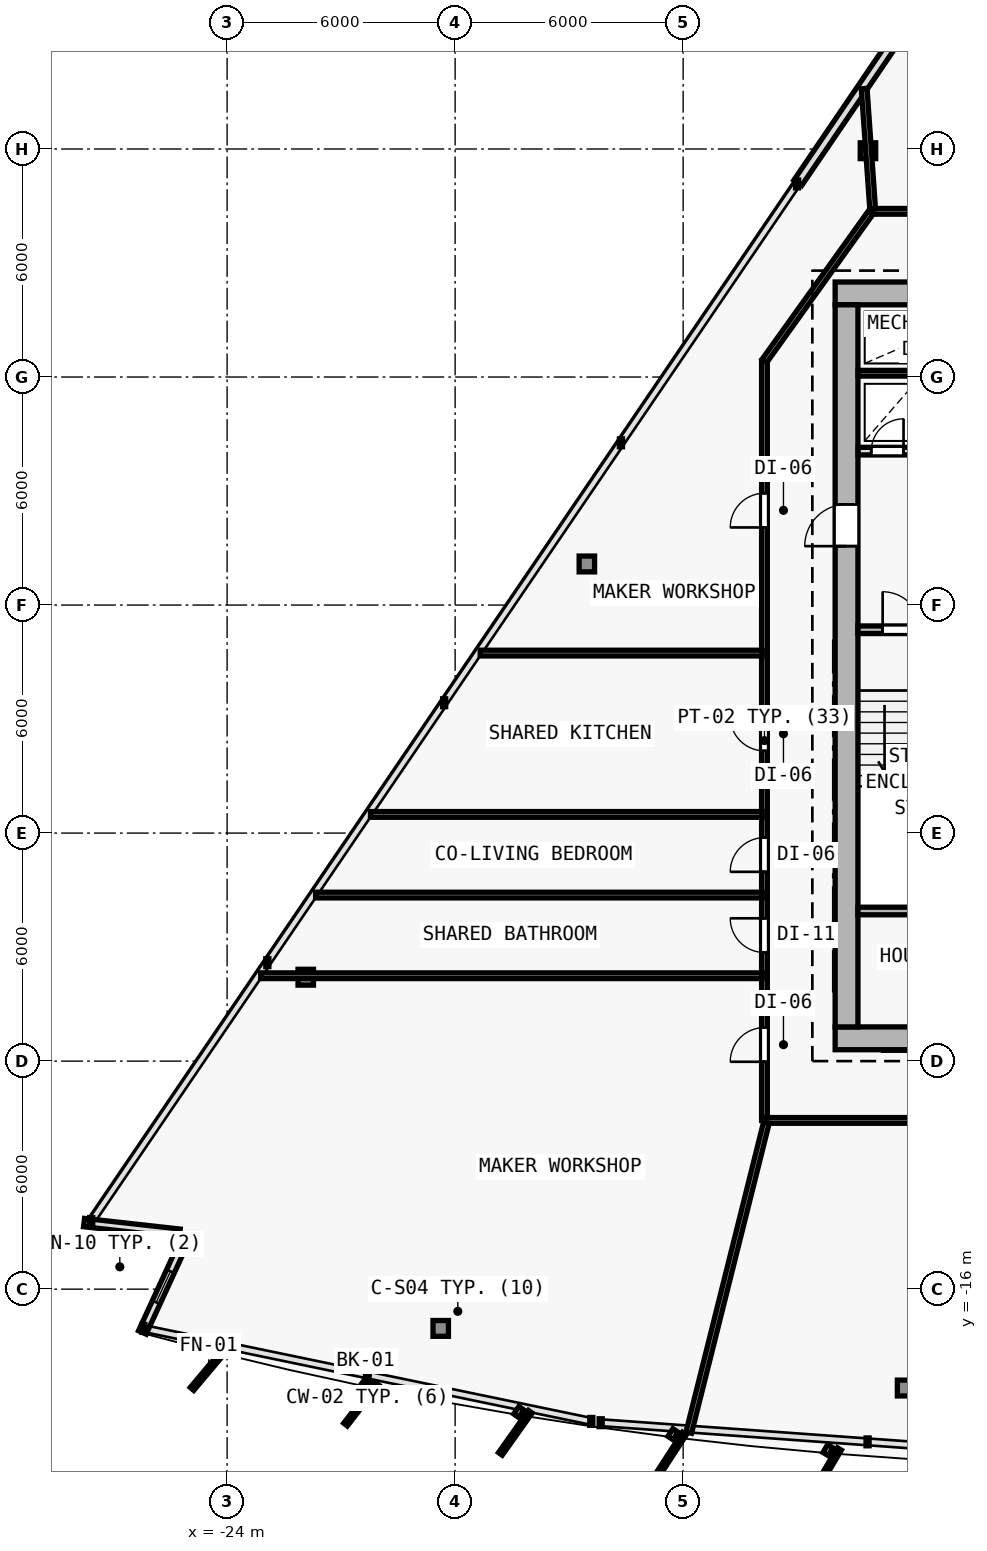
"""IFC4 building model, lengths in metres.
Left out: names, types, materials, properties, quantities, classifications, styles, units other than length and angle.
Written with IfcOpenShell. Run it as: python <this file> out.ifc"""

import sys

from ifc_helpers import new_model, si_unit, direction, frame, frame_2d, origin, origin_2d, place, context, subcontext, project, spatial, rectangle, i_section, extrude, element, fill, save


model = new_model("IFC4")
c1 = context("Model", 3, precision=1e-05, world=origin(), true_north=direction((0.0, 1.0)))
c2 = subcontext(c1, "Body", "Model", "MODEL_VIEW")
j1 = project(units=[si_unit("LENGTHUNIT", "METRE"), si_unit("PLANEANGLEUNIT", "RADIAN")], contexts=[c1])
p1 = place(None, origin())
s1 = spatial("IfcSite", under=j1, at=p1, CompositionType="ELEMENT")
p2 = place(p1, origin())
s2 = spatial("IfcBuilding", under=s1, at=p2, CompositionType="ELEMENT")
p3 = place(p2, frame((0.0, 0.0, 125.7)))
s3 = spatial("IfcBuildingStorey", under=s2, at=p3, CompositionType="ELEMENT", Elevation=125.7)
for number, where, z_axis, x_axis in (
    (1, (-7.7, -9.4, 0.0), (0.0, 0.0, 1.0), (1.0, 0.0, 0.0)),
    (2, (-7.7, 10.2, 0.0), (0.0, 0.0, 1.0), (1.0, 0.0, 0.0)),
    (3, (-7.7, 2.0, 0.0), (0.0, 0.0, 1.0), (1.0, 0.0, 0.0)),
):
    element("IfcColumn", number, at=place(p3, frame(where, z_axis=z_axis, x_axis=x_axis)), inside=s3, PredefinedType="COLUMN", context=c2, shape_type="SweptSolid", body=[
        extrude(i_section(OverallWidth=0.409, OverallDepth=0.425, WebThickness=0.021, FlangeThickness=0.034, FilletRadius=0.015, at=origin_2d()), origin(), (0.0, 0.0, 1.0), 3.6),
    ])
p4 = place(p3, frame((-18.379, -17.033, 0.006), z_axis=(0.020596292833, 0.033511459955, 0.999226087917), x_axis=(-0.851954850327, 0.523615252838, 0.0)))
e4 = element("IfcColumn", 4, at=p4, inside=s3, PredefinedType="COLUMN", context=c2, shape_type="SweptSolid", body=[
    extrude(i_section(OverallWidth=0.406, OverallDepth=0.416, WebThickness=0.019, FlangeThickness=0.031, FilletRadius=0.015, at=origin_2d()), origin(), (0.0, 0.0, 1.0), 3.592),
])
p5 = place(p3, frame((-6.16, -18.602, 0.006), z_axis=(0.006934288159, 0.035283289748, 0.999353293441), x_axis=(-0.981229659911, 0.192842823335, 0.0)))
e5 = element("IfcColumn", 5, at=p5, inside=s3, PredefinedType="COLUMN", context=c2, shape_type="SweptSolid", body=[
    extrude(i_section(OverallWidth=0.406, OverallDepth=0.416, WebThickness=0.019, FlangeThickness=0.031, FilletRadius=0.015, at=origin_2d()), origin(), (0.0, 0.0, 1.0), 3.591),
])
p6 = place(p3, frame((-7.137, 13.954, 0.006), z_axis=(0.008843163607, -0.002516900411, 0.999957730942), x_axis=(0.273743828055, 0.961802639112, 0.0)))
e6 = element("IfcColumn", 6, at=p6, inside=s3, PredefinedType="COLUMN", context=c2, shape_type="SweptSolid", body=[
    extrude(i_section(OverallWidth=0.406, OverallDepth=0.416, WebThickness=0.019, FlangeThickness=0.031, FilletRadius=0.015, at=origin_2d()), origin(), (0.0, 0.0, 1.0), 3.589),
])
p7 = place(p3, frame((-14.533, 3.081, 0.006), z_axis=(0.017003572908, 0.009522000828, 0.999810086971), x_axis=(-0.488603368932, 0.87250601595, 0.0)))
e7 = element("IfcColumn", 7, at=p7, inside=s3, PredefinedType="COLUMN", context=c2, shape_type="SweptSolid", body=[
    extrude(i_section(OverallWidth=0.406, OverallDepth=0.416, WebThickness=0.019, FlangeThickness=0.031, FilletRadius=0.015, at=origin_2d()), origin(), (0.0, 0.0, 1.0), 3.59),
])
p8 = place(p3, frame((-21.93, -7.792, 0.006), z_axis=(0.025224163578, 0.021620711639, 0.999447990843), x_axis=(-0.650791373456, 0.759256602365, 0.0)))
e8 = element("IfcColumn", 8, at=p8, inside=s3, PredefinedType="COLUMN", context=c2, shape_type="SweptSolid", body=[
    extrude(i_section(OverallWidth=0.406, OverallDepth=0.416, WebThickness=0.019, FlangeThickness=0.031, FilletRadius=0.015, at=origin_2d()), origin(), (0.0, 0.0, 1.0), 3.591),
])
p9 = place(p3, frame((-8.984, 13.108, 0.0), z_axis=(0.0, 0.0, 1.0), x_axis=(0.562459365703, 0.826824928225, 0.0)))
e9 = element("IfcWall", 9, at=p9, inside=s3, PredefinedType="SOLIDWALL", context=c2, shape_type="SweptSolid", body=[
    extrude(rectangle(XDim=11.625, YDim=0.25, at=frame_2d((5.812, 0.0))), origin(), (0.0, 0.0, 1.0), 3.28),
])
p10 = place(p9, frame((5.212, 0.0, 0.62)))
e10 = element("IfcOpeningElement", 10, at=p10, cuts=e9, PredefinedType="OPENING", context=c2, shape_type="SweptSolid", body=[
    extrude(rectangle(XDim=1.2, YDim=1.8, at=frame_2d((0.6, 0.9))), frame((0.0, 0.135, 0.0), z_axis=(0.0, -1.0, 0.0), x_axis=(1.0, 0.0, 0.0)), (0.0, 0.0, 1.0), 0.27),
])
p11 = place(p3, frame((-25.246, -14.529, 0.0), z_axis=(0.0, 0.0, 1.0), x_axis=(-0.993831926713, 0.110896805395, 0.0)))
e11 = element("IfcWall", 11, at=p11, inside=s3, PredefinedType="SOLIDWALL", context=c2, shape_type="SweptSolid", body=[
    extrude(rectangle(XDim=2.534, YDim=0.22, at=frame_2d((1.267, 0.0))), origin(), (0.0, 0.0, 1.0), 3.28),
])
p12 = place(p3, frame((-26.229, -17.139, 0.0), z_axis=(0.0, 0.0, 1.0), x_axis=(0.417498108462, 0.908677791866, 0.0)))
e12 = element("IfcWall", 12, at=p12, inside=s3, PredefinedType="SOLIDWALL", context=c2, shape_type="SweptSolid", body=[
    extrude(rectangle(XDim=2.641, YDim=0.22, at=frame_2d((1.32, 0.0))), origin(), (0.0, 0.0, 1.0), 3.28),
])
p13 = place(p12, frame((0.87, 0.0, 0.62)))
e13 = element("IfcOpeningElement", 13, at=p13, cuts=e12, PredefinedType="OPENING", context=c2, shape_type="SweptSolid", body=[
    extrude(rectangle(XDim=0.9, YDim=1.6, at=frame_2d((0.45, 0.8))), frame((0.0, 0.12, 0.0), z_axis=(0.0, -1.0, 0.0), x_axis=(1.0, 0.0, 0.0)), (0.0, 0.0, 1.0), 0.24),
])
p14 = place(p3, frame((-8.0, -9.4, 0.0), z_axis=(0.0, 0.0, 1.0), x_axis=(1.0, 0.0, 0.0)))
e14 = element("IfcWall", 14, at=p14, inside=s3, PredefinedType="SHEAR", context=c2, shape_type="SweptSolid", body=[
    extrude(rectangle(XDim=16.0, YDim=0.6, at=frame_2d((8.0, 0.0))), origin(), (0.0, 0.0, 1.0), 3.28),
])
p15 = place(p14, frame((9.65, 0.0, 0.0)))
e15 = element("IfcOpeningElement", 15, at=p15, cuts=e14, PredefinedType="OPENING", context=c2, shape_type="SweptSolid", body=[
    extrude(rectangle(XDim=1.5, YDim=2.2, at=frame_2d((0.75, 1.1))), frame((0.0, 0.31, 0.0), z_axis=(0.0, -1.0, 0.0), x_axis=(1.0, 0.0, 0.0)), (0.0, 0.0, 1.0), 0.62),
])
p16 = place(p3, frame((8.0, 10.2, 0.0), z_axis=(0.0, 0.0, 1.0), x_axis=(-1.0, 0.0, 0.0)))
e16 = element("IfcWall", 16, at=p16, inside=s3, PredefinedType="SHEAR", context=c2, shape_type="SweptSolid", body=[
    extrude(rectangle(XDim=16.0, YDim=0.6, at=frame_2d((8.0, 0.0))), origin(), (0.0, 0.0, 1.0), 3.28),
])
p17 = place(p16, frame((4.45, 0.0, 0.0)))
e17 = element("IfcOpeningElement", 17, at=p17, cuts=e16, PredefinedType="OPENING", context=c2, shape_type="SweptSolid", body=[
    extrude(rectangle(XDim=1.1, YDim=2.15, at=frame_2d((0.55, 1.075))), frame((0.0, 0.31, 0.0), z_axis=(0.0, -1.0, 0.0), x_axis=(1.0, 0.0, 0.0)), (0.0, 0.0, 1.0), 0.62),
])
p18 = place(p3, frame((-7.7, -9.1, 0.0), z_axis=(0.0, 0.0, 1.0), x_axis=(0.0, 1.0, 0.0)))
e18 = element("IfcWall", 18, at=p18, inside=s3, PredefinedType="SHEAR", context=c2, shape_type="SweptSolid", body=[
    extrude(rectangle(XDim=19.0, YDim=0.6, at=frame_2d((9.5, 0.0))), origin(), (0.0, 0.0, 1.0), 3.28),
])
p19 = place(p18, frame((12.65, 0.0, 0.0)))
e19 = element("IfcOpeningElement", 19, at=p19, cuts=e18, PredefinedType="OPENING", context=c2, shape_type="SweptSolid", body=[
    extrude(rectangle(XDim=1.1, YDim=2.15, at=frame_2d((0.55, 1.075))), frame((0.0, 0.31, 0.0), z_axis=(0.0, -1.0, 0.0), x_axis=(1.0, 0.0, 0.0)), (0.0, 0.0, 1.0), 0.62),
])
p20 = place(p3, frame((-7.4, 1.35, 0.0), z_axis=(0.0, 0.0, 1.0), x_axis=(1.0, 0.0, 0.0)))
e20 = element("IfcWall", 20, at=p20, inside=s3, PredefinedType="SOLIDWALL", context=c2, shape_type="SweptSolid", body=[
    extrude(rectangle(XDim=3.35, YDim=0.2, at=frame_2d((1.675, 0.0))), origin(), (0.0, 0.0, 1.0), 3.28),
])
p21 = place(p20, frame((0.65, 0.0, 0.0)))
e21 = element("IfcOpeningElement", 21, at=p21, cuts=e20, PredefinedType="OPENING", context=c2, shape_type="SweptSolid", body=[
    extrude(rectangle(XDim=1.0, YDim=2.15, at=frame_2d((0.5, 1.075))), frame((0.0, 0.11, 0.0), z_axis=(0.0, -1.0, 0.0), x_axis=(1.0, 0.0, 0.0)), (0.0, 0.0, 1.0), 0.22),
])
p22 = place(p3, frame((-7.395, 6.05, 0.0), z_axis=(0.0, 0.0, 1.0), x_axis=(1.0, 0.0, 0.0)))
e22 = element("IfcWall", 22, at=p22, inside=s3, PredefinedType="SOLIDWALL", context=c2, shape_type="SweptSolid", body=[
    extrude(rectangle(XDim=3.545, YDim=0.2, at=frame_2d((1.772, 0.0))), origin(), (0.0, 0.0, 1.0), 3.28),
])
p23 = place(p22, frame((0.345, 0.0, 0.0)))
e23 = element("IfcOpeningElement", 23, at=p23, cuts=e22, PredefinedType="OPENING", context=c2, shape_type="SweptSolid", body=[
    extrude(rectangle(XDim=0.85, YDim=2.1, at=frame_2d((0.425, 1.05))), frame((0.0, 0.11, 0.0), z_axis=(0.0, -1.0, 0.0), x_axis=(1.0, 0.0, 0.0)), (0.0, 0.0, 1.0), 0.22),
])
p24 = place(p22, frame((2.145, 0.0, 0.0)))
e24 = element("IfcOpeningElement", 24, at=p24, cuts=e22, PredefinedType="OPENING", context=c2, shape_type="SweptSolid", body=[
    extrude(rectangle(XDim=0.85, YDim=2.1, at=frame_2d((0.425, 1.05))), frame((0.0, 0.11, 0.0), z_axis=(0.0, -1.0, 0.0), x_axis=(1.0, 0.0, 0.0)), (0.0, 0.0, 1.0), 0.22),
])
p25 = place(p3, frame((-7.395, 8.1, 0.0), z_axis=(0.0, 0.0, 1.0), x_axis=(1.0, 0.0, 0.0)))
e25 = element("IfcWall", 25, at=p25, inside=s3, PredefinedType="PARTITIONING", context=c2, shape_type="SweptSolid", body=[
    extrude(rectangle(XDim=3.545, YDim=0.15, at=frame_2d((1.772, 0.0))), origin(), (0.0, 0.0, 1.0), 3.28),
])
p26 = place(p3, frame((-7.4, -6.05, 0.0), z_axis=(0.0, 0.0, 1.0), x_axis=(1.0, 0.0, 0.0)))
e26 = element("IfcWall", 26, at=p26, inside=s3, PredefinedType="SOLIDWALL", context=c2, shape_type="SweptSolid", body=[
    extrude(rectangle(XDim=3.35, YDim=0.2, at=frame_2d((1.675, 0.0))), origin(), (0.0, 0.0, 1.0), 3.28),
])
p27 = place(p3, frame((-9.86, -11.56, 0.0), z_axis=(0.0, 0.0, 1.0), x_axis=(0.0, 1.0, 0.0)))
e27 = element("IfcWall", 27, at=p27, inside=s3, PredefinedType="PARTITIONING", context=c2, shape_type="SweptSolid", body=[
    extrude(rectangle(XDim=19.986, YDim=0.15, at=frame_2d((9.993, 0.0))), origin(), (0.0, 0.0, 1.0), 2.635),
])
p28 = place(p27, frame((9.724, 0.0, 0.0)))
e28 = element("IfcOpeningElement", 28, at=p28, cuts=e27, PredefinedType="OPENING", context=c2, shape_type="SweptSolid", body=[
    extrude(rectangle(XDim=0.9, YDim=2.1, at=frame_2d((0.45, 1.05))), frame((0.0, 0.085, 0.0), z_axis=(0.0, -1.0, 0.0), x_axis=(1.0, 0.0, 0.0)), (0.0, 0.0, 1.0), 0.17),
])
p29 = place(p27, frame((6.54, 0.0, 0.0)))
e29 = element("IfcOpeningElement", 29, at=p29, cuts=e27, PredefinedType="OPENING", context=c2, shape_type="SweptSolid", body=[
    extrude(rectangle(XDim=0.9, YDim=2.1, at=frame_2d((0.45, 1.05))), frame((0.0, 0.085, 0.0), z_axis=(0.0, -1.0, 0.0), x_axis=(1.0, 0.0, 0.0)), (0.0, 0.0, 1.0), 0.17),
])
p30 = place(p27, frame((4.418, 0.0, 0.0)))
e30 = element("IfcOpeningElement", 30, at=p30, cuts=e27, PredefinedType="OPENING", context=c2, shape_type="SweptSolid", body=[
    extrude(rectangle(XDim=0.9, YDim=2.1, at=frame_2d((0.45, 1.05))), frame((0.0, 0.085, 0.0), z_axis=(0.0, -1.0, 0.0), x_axis=(1.0, 0.0, 0.0)), (0.0, 0.0, 1.0), 0.17),
])
p31 = place(p27, frame((1.542, 0.0, 0.0)))
e31 = element("IfcOpeningElement", 31, at=p31, cuts=e27, PredefinedType="OPENING", context=c2, shape_type="SweptSolid", body=[
    extrude(rectangle(XDim=0.9, YDim=2.1, at=frame_2d((0.45, 1.05))), frame((0.0, 0.085, 0.0), z_axis=(0.0, -1.0, 0.0), x_axis=(1.0, 0.0, 0.0)), (0.0, 0.0, 1.0), 0.17),
])
p32 = place(p27, frame((15.602, 0.0, 0.0)))
e32 = element("IfcOpeningElement", 32, at=p32, cuts=e27, PredefinedType="OPENING", context=c2, shape_type="SweptSolid", body=[
    extrude(rectangle(XDim=0.9, YDim=2.1, at=frame_2d((0.45, 1.05))), frame((0.0, 0.085, 0.0), z_axis=(0.0, -1.0, 0.0), x_axis=(1.0, 0.0, 0.0)), (0.0, 0.0, 1.0), 0.17),
])
p33 = place(p3, frame((-9.86, 8.426, 0.0), z_axis=(0.0, 0.0, 1.0), x_axis=(0.582449511476, 0.812866881218, 0.0)))
e33 = element("IfcWall", 33, at=p33, inside=s3, PredefinedType="PARTITIONING", context=c2, shape_type="SweptSolid", body=[
    extrude(rectangle(XDim=4.84, YDim=0.15, at=frame_2d((2.42, 0.0))), origin(), (0.0, 0.0, 1.0), 2.895),
])
p34 = place(p3, frame((-7.041, 12.36, 0.0), z_axis=(0.0, 0.0, 1.0), x_axis=(1.0, 0.0, 0.0)))
e34 = element("IfcWall", 34, at=p34, inside=s3, PredefinedType="PARTITIONING", context=c2, shape_type="SweptSolid", body=[
    extrude(rectangle(XDim=14.064, YDim=0.15, at=frame_2d((7.032, 0.0))), origin(), (0.0, 0.0, 1.0), 3.28),
])
p35 = place(p34, frame((12.016, 0.0, 0.0)))
e35 = element("IfcOpeningElement", 35, at=p35, cuts=e34, PredefinedType="OPENING", context=c2, shape_type="SweptSolid", body=[
    extrude(rectangle(XDim=0.9, YDim=2.1, at=frame_2d((0.45, 1.05))), frame((0.0, 0.085, 0.0), z_axis=(0.0, -1.0, 0.0), x_axis=(1.0, 0.0, 0.0)), (0.0, 0.0, 1.0), 0.17),
])
p36 = place(p34, frame((9.767, 0.0, 0.0)))
e36 = element("IfcOpeningElement", 36, at=p36, cuts=e34, PredefinedType="OPENING", context=c2, shape_type="SweptSolid", body=[
    extrude(rectangle(XDim=0.85, YDim=2.1, at=frame_2d((0.425, 1.05))), frame((0.0, 0.085, 0.0), z_axis=(0.0, -1.0, 0.0), x_axis=(1.0, 0.0, 0.0)), (0.0, 0.0, 1.0), 0.17),
])
p37 = place(p34, frame((8.112, 0.0, 0.0)))
e37 = element("IfcOpeningElement", 37, at=p37, cuts=e34, PredefinedType="OPENING", context=c2, shape_type="SweptSolid", body=[
    extrude(rectangle(XDim=0.85, YDim=2.1, at=frame_2d((0.425, 1.05))), frame((0.0, 0.085, 0.0), z_axis=(0.0, -1.0, 0.0), x_axis=(1.0, 0.0, 0.0)), (0.0, 0.0, 1.0), 0.17),
])
p38 = place(p34, frame((3.506, 0.0, 0.0)))
e38 = element("IfcOpeningElement", 38, at=p38, cuts=e34, PredefinedType="OPENING", context=c2, shape_type="SweptSolid", body=[
    extrude(rectangle(XDim=0.9, YDim=2.1, at=frame_2d((0.45, 1.05))), frame((0.0, 0.085, 0.0), z_axis=(0.0, -1.0, 0.0), x_axis=(1.0, 0.0, 0.0)), (0.0, 0.0, 1.0), 0.17),
])
p39 = place(p3, frame((13.18, -11.56, 0.0), z_axis=(0.0, 0.0, 1.0), x_axis=(-1.0, 0.0, 0.0)))
e39 = element("IfcWall", 39, at=p39, inside=s3, PredefinedType="PARTITIONING", context=c2, shape_type="SweptSolid", body=[
    extrude(rectangle(XDim=23.04, YDim=0.15, at=frame_2d((11.52, 0.0))), origin(), (0.0, 0.0, 1.0), 2.705),
])
p40 = place(p39, frame((14.497, 0.0, 0.0)))
e40 = element("IfcOpeningElement", 40, at=p40, cuts=e39, PredefinedType="OPENING", context=c2, shape_type="SweptSolid", body=[
    extrude(rectangle(XDim=0.9, YDim=2.1, at=frame_2d((0.45, 1.05))), frame((0.0, 0.085, 0.0), z_axis=(0.0, -1.0, 0.0), x_axis=(1.0, 0.0, 0.0)), (0.0, 0.0, 1.0), 0.17),
])
p41 = place(p39, frame((3.156, 0.0, 0.0)))
e41 = element("IfcOpeningElement", 41, at=p41, cuts=e39, PredefinedType="OPENING", context=c2, shape_type="SweptSolid", body=[
    extrude(rectangle(XDim=0.9, YDim=2.1, at=frame_2d((0.45, 1.05))), frame((0.0, 0.085, 0.0), z_axis=(0.0, -1.0, 0.0), x_axis=(1.0, 0.0, 0.0)), (0.0, 0.0, 1.0), 0.17),
])
p42 = place(p3, frame((-7.013, 12.419, 0.0), z_axis=(0.0, 0.0, 1.0), x_axis=(-0.070149488987, 0.997536490157, 0.0)))
e42 = element("IfcWall", 42, at=p42, inside=s3, PredefinedType="PARTITIONING", context=c2, shape_type="SweptSolid", body=[
    extrude(rectangle(XDim=3.177, YDim=0.15, at=frame_2d((1.589, 0.0))), origin(), (0.0, 0.0, 1.0), 2.815),
])
p43 = place(p3, frame((-9.92, -7.753, 0.0), z_axis=(0.0, 0.0, 1.0), x_axis=(-1.0, 0.0, 0.0)))
e43 = element("IfcWall", 43, at=p43, inside=s3, PredefinedType="PARTITIONING", context=c2, shape_type="SweptSolid", body=[
    extrude(rectangle(XDim=13.195, YDim=0.15, at=frame_2d((6.598, 0.0))), origin(), (0.0, 0.0, 1.0), 2.635),
])
p44 = place(p3, frame((-9.92, 0.736, 0.0), z_axis=(0.0, 0.0, 1.0), x_axis=(-1.0, 0.0, 0.0)))
e44 = element("IfcWall", 44, at=p44, inside=s3, PredefinedType="PARTITIONING", context=c2, shape_type="SweptSolid", body=[
    extrude(rectangle(XDim=7.42, YDim=0.15, at=frame_2d((3.71, 0.0))), origin(), (0.0, 0.0, 1.0), 2.815),
])
p45 = place(p3, frame((-9.808, -11.617, 0.0), z_axis=(0.0, 0.0, 1.0), x_axis=(-0.242952318764, -0.970038231622, 0.0)))
e45 = element("IfcWall", 45, at=p45, inside=s3, PredefinedType="PARTITIONING", context=c2, shape_type="SweptSolid", body=[
    extrude(rectangle(XDim=8.409, YDim=0.15, at=frame_2d((4.205, 0.0))), origin(), (0.0, 0.0, 1.0), 2.815),
])
p46 = place(p3, frame((-9.92, -3.509, 0.0), z_axis=(0.0, 0.0, 1.0), x_axis=(-1.0, 0.0, 0.0)))
e46 = element("IfcWall", 46, at=p46, inside=s3, PredefinedType="PARTITIONING", context=c2, shape_type="SweptSolid", body=[
    extrude(rectangle(XDim=10.308, YDim=0.15, at=frame_2d((5.154, 0.0))), origin(), (0.0, 0.0, 1.0), 2.815),
])
p47 = place(p3, frame((-9.92, -5.631, 0.0), z_axis=(0.0, 0.0, 1.0), x_axis=(-1.0, 0.0, 0.0)))
e47 = element("IfcWall", 47, at=p47, inside=s3, PredefinedType="PARTITIONING", context=c2, shape_type="SweptSolid", body=[
    extrude(rectangle(XDim=11.751, YDim=0.15, at=frame_2d((5.876, 0.0))), origin(), (0.0, 0.0, 1.0), 2.815),
])
p48 = place(p13, origin())
e48 = element("IfcWindow", 48, at=p48, inside=s3, PartitioningType="SINGLE_PANEL", PredefinedType="WINDOW", context=c2, shape_type="SweptSolid", body=[
    extrude(rectangle(XDim=0.9, YDim=1.6, at=frame_2d((0.45, 0.8))), frame((0.0, 0.03, 0.0), z_axis=(0.0, -1.0, 0.0), x_axis=(1.0, 0.0, 0.0)), (0.0, 0.0, 1.0), 0.06),
])
fill(e13, e48)
p49 = place(p19, origin())
e49 = element("IfcDoor", 49, at=p49, inside=s3, OperationType="SINGLE_SWING_LEFT", PredefinedType="DOOR", context=c2, shape_type="SweptSolid", body=[
    extrude(rectangle(XDim=1.1, YDim=2.15, at=frame_2d((0.55, 1.075))), frame((0.0, 0.025, 0.0), z_axis=(0.0, -1.0, 0.0), x_axis=(1.0, 0.0, 0.0)), (0.0, 0.0, 1.0), 0.05),
])
fill(e19, e49)
p50 = place(p21, origin())
e50 = element("IfcDoor", 50, at=p50, inside=s3, OperationType="SINGLE_SWING_LEFT", PredefinedType="DOOR", context=c2, shape_type="SweptSolid", body=[
    extrude(rectangle(XDim=1.0, YDim=2.15, at=frame_2d((0.5, 1.075))), frame((0.0, 0.025, 0.0), z_axis=(0.0, -1.0, 0.0), x_axis=(1.0, 0.0, 0.0)), (0.0, 0.0, 1.0), 0.05),
])
fill(e21, e50)
p51 = place(p23, origin())
e51 = element("IfcDoor", 51, at=p51, inside=s3, OperationType="SINGLE_SWING_RIGHT", PredefinedType="DOOR", context=c2, shape_type="SweptSolid", body=[
    extrude(rectangle(XDim=0.85, YDim=2.1, at=frame_2d((0.425, 1.05))), frame((0.0, 0.025, 0.0), z_axis=(0.0, -1.0, 0.0), x_axis=(1.0, 0.0, 0.0)), (0.0, 0.0, 1.0), 0.05),
])
fill(e23, e51)
p52 = place(p28, origin())
e52 = element("IfcDoor", 52, at=p52, inside=s3, OperationType="SINGLE_SWING_RIGHT", PredefinedType="DOOR", context=c2, shape_type="SweptSolid", body=[
    extrude(rectangle(XDim=0.9, YDim=2.1, at=frame_2d((0.45, 1.05))), frame((0.0, 0.025, 0.0), z_axis=(0.0, -1.0, 0.0), x_axis=(1.0, 0.0, 0.0)), (0.0, 0.0, 1.0), 0.05),
])
fill(e28, e52)
p53 = place(p29, origin())
e53 = element("IfcDoor", 53, at=p53, inside=s3, OperationType="SINGLE_SWING_LEFT", PredefinedType="DOOR", context=c2, shape_type="SweptSolid", body=[
    extrude(rectangle(XDim=0.9, YDim=2.1, at=frame_2d((0.45, 1.05))), frame((0.0, 0.025, 0.0), z_axis=(0.0, -1.0, 0.0), x_axis=(1.0, 0.0, 0.0)), (0.0, 0.0, 1.0), 0.05),
])
fill(e29, e53)
p54 = place(p30, origin())
e54 = element("IfcDoor", 54, at=p54, inside=s3, OperationType="SINGLE_SWING_RIGHT", PredefinedType="DOOR", context=c2, shape_type="SweptSolid", body=[
    extrude(rectangle(XDim=0.9, YDim=2.1, at=frame_2d((0.45, 1.05))), frame((0.0, 0.025, 0.0), z_axis=(0.0, -1.0, 0.0), x_axis=(1.0, 0.0, 0.0)), (0.0, 0.0, 1.0), 0.05),
])
fill(e30, e54)
p55 = place(p31, origin())
e55 = element("IfcDoor", 55, at=p55, inside=s3, OperationType="SINGLE_SWING_LEFT", PredefinedType="DOOR", context=c2, shape_type="SweptSolid", body=[
    extrude(rectangle(XDim=0.9, YDim=2.1, at=frame_2d((0.45, 1.05))), frame((0.0, 0.025, 0.0), z_axis=(0.0, -1.0, 0.0), x_axis=(1.0, 0.0, 0.0)), (0.0, 0.0, 1.0), 0.05),
])
fill(e31, e55)
p56 = place(p32, origin())
e56 = element("IfcDoor", 56, at=p56, inside=s3, OperationType="SINGLE_SWING_LEFT", PredefinedType="DOOR", context=c2, shape_type="SweptSolid", body=[
    extrude(rectangle(XDim=0.9, YDim=2.1, at=frame_2d((0.45, 1.05))), frame((0.0, 0.025, 0.0), z_axis=(0.0, -1.0, 0.0), x_axis=(1.0, 0.0, 0.0)), (0.0, 0.0, 1.0), 0.05),
])
fill(e32, e56)
save(model, sys.argv[1])
